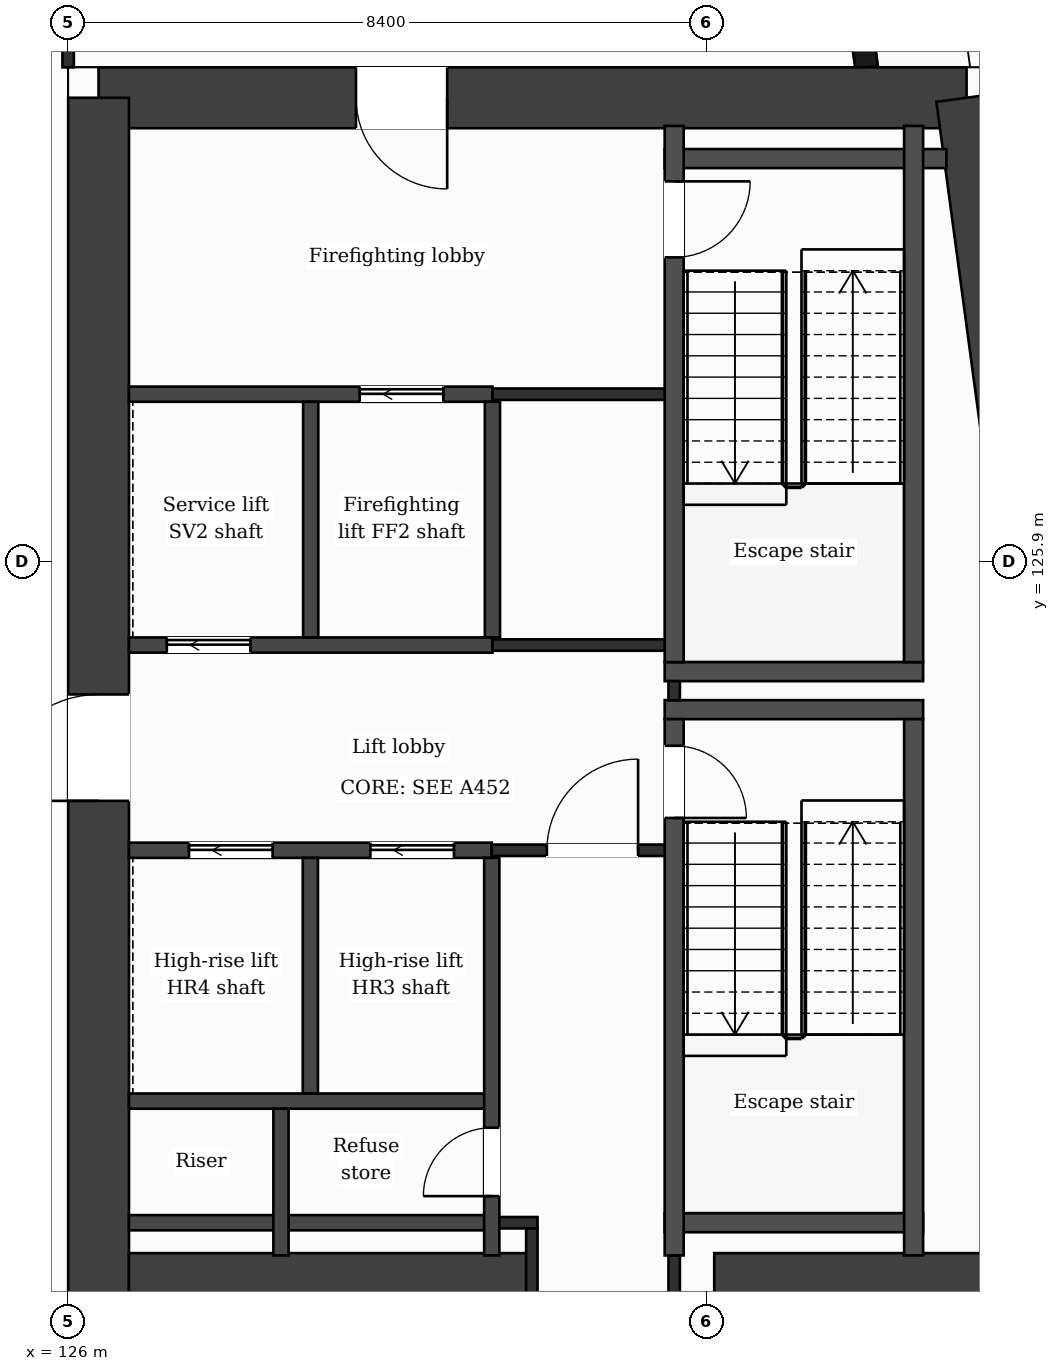
"""IFC4 building model, lengths in metres.
Left out: names, types, materials, properties, quantities, classifications, styles, units other than length and angle.
Written with IfcOpenShell. Run it as: python <this file> out.ifc"""

import sys

from ifc_helpers import new_model, si_unit, direction, frame, frame_2d, origin, place, context, subcontext, project, spatial, rectangle, extrude, element, fill, save


model = new_model("IFC4")
c1 = context("Model", 3, precision=1e-05, world=origin(), true_north=direction((0.0, 1.0)))
c2 = subcontext(c1, "Body", "Model", "MODEL_VIEW")
j1 = project(units=[si_unit("LENGTHUNIT", "METRE"), si_unit("PLANEANGLEUNIT", "RADIAN")], contexts=[c1])
p1 = place(None, origin())
s1 = spatial("IfcSite", under=j1, at=p1, CompositionType="ELEMENT")
p2 = place(p1, origin())
s2 = spatial("IfcBuilding", under=s1, at=p2, CompositionType="ELEMENT")
p3 = place(p2, frame((0.0, 0.0, 213.3)))
s3 = spatial("IfcBuildingStorey", under=s2, at=p3, CompositionType="ELEMENT", Elevation=213.3)
p4 = place(p3, frame((126.4, 132.0, 0.0), z_axis=(0.0, 0.0, 1.0), x_axis=(1.0, 0.0, 0.0)))
e1 = element("IfcWall", 1, at=p4, inside=s3, PredefinedType="SHEAR", context=c2, shape_type="SweptSolid", body=[
    extrude(rectangle(XDim=11.42, YDim=0.8, at=frame_2d((5.71, 0.0))), origin(), (0.0, 0.0, 1.0), 3.7),
])
p5 = place(p4, frame((3.386, 0.0, 0.0)))
e2 = element("IfcOpeningElement", 2, at=p5, cuts=e1, PredefinedType="OPENING", context=c2, shape_type="SweptSolid", body=[
    extrude(rectangle(XDim=1.2, YDim=2.1, at=frame_2d((0.6, 1.05))), frame((0.0, 0.41, 0.0), z_axis=(0.0, -1.0, 0.0), x_axis=(1.0, 0.0, 0.0)), (0.0, 0.0, 1.0), 0.82),
])
p6 = place(p3, frame((137.82, 132.0, 0.0), z_axis=(0.0, 0.0, 1.0), x_axis=(0.133408347329, -0.991061154956, 0.0)))
e3 = element("IfcWall", 3, at=p6, inside=s3, PredefinedType="SHEAR", context=c2, shape_type="SweptSolid", body=[
    extrude(rectangle(XDim=21.391, YDim=0.8, at=frame_2d((10.696, 0.0))), origin(), (0.0, 0.0, 1.0), 3.7),
])
p7 = place(p3, frame((126.4, 110.8, 0.0), z_axis=(0.0, 0.0, 1.0), x_axis=(0.0, 1.0, 0.0)))
e4 = element("IfcWall", 4, at=p7, inside=s3, PredefinedType="SHEAR", context=c2, shape_type="SweptSolid", body=[
    extrude(rectangle(XDim=21.2, YDim=0.8, at=frame_2d((10.6, 0.0))), origin(), (0.0, 0.0, 1.0), 3.7),
])
p8 = place(p7, frame((11.95, 0.0, 0.0)))
e5 = element("IfcOpeningElement", 5, at=p8, cuts=e4, PredefinedType="OPENING", context=c2, shape_type="SweptSolid", body=[
    extrude(rectangle(XDim=1.4, YDim=2.1, at=frame_2d((0.7, 1.05))), frame((0.0, 0.41, 0.0), z_axis=(0.0, -1.0, 0.0), x_axis=(1.0, 0.0, 0.0)), (0.0, 0.0, 1.0), 0.82),
])
p9 = place(p3, frame((126.8, 116.4, 0.0), z_axis=(0.0, 0.0, 1.0), x_axis=(1.0, 0.0, 0.0)))
e6 = element("IfcWall", 6, at=p9, inside=s3, PredefinedType="SHEAR", context=c2, shape_type="SweptSolid", body=[
    extrude(rectangle(XDim=5.3, YDim=0.8, at=frame_2d((2.65, 0.0))), origin(), (0.0, 0.0, 1.0), 3.7),
])
p10 = place(p3, frame((134.5, 116.4, 0.0), z_axis=(0.0, 0.0, 1.0), x_axis=(1.0, 0.0, 0.0)))
e7 = element("IfcWall", 7, at=p10, inside=s3, PredefinedType="SHEAR", context=c2, shape_type="SweptSolid", body=[
    extrude(rectangle(XDim=5.077, YDim=0.8, at=frame_2d((2.539, 0.0))), origin(), (0.0, 0.0, 1.0), 3.7),
])
p11 = place(p3, frame((136.504, 132.4, 0.0), z_axis=(0.0, 0.0, 1.0), x_axis=(-0.133399697462, 0.99106231929, 0.0)))
e8 = element("IfcWall", 8, at=p11, inside=s3, PredefinedType="SOLIDWALL", context=c2, shape_type="SweptSolid", body=[
    extrude(rectangle(XDim=6.74, YDim=0.3, at=frame_2d((3.37, 0.0))), origin(), (0.0, 0.0, 1.0), 3.38),
])
p12 = place(p11, frame((1.115, 0.0, 0.0)))
e9 = element("IfcOpeningElement", 9, at=p12, cuts=e8, PredefinedType="OPENING", context=c2, shape_type="SweptSolid", body=[
    extrude(rectangle(XDim=1.2, YDim=2.4, at=frame_2d((0.6, 1.2))), frame((0.0, 0.16, 0.0), z_axis=(0.0, -1.0, 0.0), x_axis=(1.0, 0.0, 0.0)), (0.0, 0.0, 1.0), 0.32),
])
p13 = place(p11, frame((3.835, 0.0, 0.9)))
e10 = element("IfcOpeningElement", 10, at=p13, cuts=e8, PredefinedType="OPENING", context=c2, shape_type="SweptSolid", body=[
    extrude(rectangle(XDim=2.4, YDim=2.1, at=frame_2d((1.2, 1.05))), frame((0.0, 0.16, 0.0), z_axis=(0.0, -1.0, 0.0), x_axis=(1.0, 0.0, 0.0)), (0.0, 0.0, 1.0), 0.32),
])
p14 = place(p3, frame((126.8, 117.2, 0.0), z_axis=(0.0, 0.0, 1.0), x_axis=(1.0, 0.0, 0.0)))
e11 = element("IfcWall", 11, at=p14, inside=s3, PredefinedType="PARTITIONING", context=c2, shape_type="SweptSolid", body=[
    extrude(rectangle(XDim=4.773, YDim=0.2, at=frame_2d((2.386, 0.0))), origin(), (0.0, 0.0, 1.0), 3.38),
])
p15 = place(p3, frame((131.573, 117.2, 0.0), z_axis=(0.0, 0.0, 1.0), x_axis=(1.0, 0.0, 0.0)))
e12 = element("IfcWall", 12, at=p15, inside=s3, PredefinedType="PARTITIONING", context=c2, shape_type="SweptSolid", body=[
    extrude(rectangle(XDim=0.602, YDim=0.15, at=frame_2d((0.301, 0.0))), origin(), (0.0, 0.0, 1.0), 3.38),
])
p16 = place(p3, frame((133.848, 117.2, 0.0), z_axis=(0.0, 0.0, 1.0), x_axis=(1.0, 0.0, 0.0)))
e13 = element("IfcWall", 13, at=p16, inside=s3, PredefinedType="PARTITIONING", context=c2, shape_type="SweptSolid", body=[
    extrude(rectangle(XDim=3.4, YDim=0.25, at=frame_2d((1.7, 0.0))), origin(), (0.0, 0.0, 1.0), 3.38),
])
p17 = place(p3, frame((126.8, 118.8, 0.0), z_axis=(0.0, 0.0, 1.0), x_axis=(1.0, 0.0, 0.0)))
e14 = element("IfcWall", 14, at=p17, inside=s3, PredefinedType="PARTITIONING", context=c2, shape_type="SweptSolid", body=[
    extrude(rectangle(XDim=4.773, YDim=0.2, at=frame_2d((2.386, 0.0))), origin(), (0.0, 0.0, 1.0), 3.38),
])
p18 = place(p3, frame((126.8, 122.1, 0.0), z_axis=(0.0, 0.0, 1.0), x_axis=(1.0, 0.0, 0.0)))
e15 = element("IfcWall", 15, at=p18, inside=s3, PredefinedType="PARTITIONING", context=c2, shape_type="SweptSolid", body=[
    extrude(rectangle(XDim=4.773, YDim=0.2, at=frame_2d((2.386, 0.0))), origin(), (0.0, 0.0, 1.0), 3.38),
])
p19 = place(p18, frame((3.176, 0.0, 0.0)))
e16 = element("IfcOpeningElement", 16, at=p19, cuts=e15, PredefinedType="OPENING", context=c2, shape_type="SweptSolid", body=[
    extrude(rectangle(XDim=1.1, YDim=2.1, at=frame_2d((0.55, 1.05))), frame((0.0, 0.11, 0.0), z_axis=(0.0, -1.0, 0.0), x_axis=(1.0, 0.0, 0.0)), (0.0, 0.0, 1.0), 0.22),
])
p20 = place(p18, frame((0.79, 0.0, 0.0)))
e17 = element("IfcOpeningElement", 17, at=p20, cuts=e15, PredefinedType="OPENING", context=c2, shape_type="SweptSolid", body=[
    extrude(rectangle(XDim=1.1, YDim=2.1, at=frame_2d((0.55, 1.05))), frame((0.0, 0.11, 0.0), z_axis=(0.0, -1.0, 0.0), x_axis=(1.0, 0.0, 0.0)), (0.0, 0.0, 1.0), 0.22),
])
p21 = place(p3, frame((131.573, 122.1, 0.0), z_axis=(0.0, 0.0, 1.0), x_axis=(1.0, 0.0, 0.0)))
e18 = element("IfcWall", 18, at=p21, inside=s3, PredefinedType="PARTITIONING", context=c2, shape_type="SweptSolid", body=[
    extrude(rectangle(XDim=2.4, YDim=0.15, at=frame_2d((1.2, 0.0))), origin(), (0.0, 0.0, 1.0), 3.38),
])
p22 = place(p21, frame((0.725, 0.0, 0.0)))
e19 = element("IfcOpeningElement", 19, at=p22, cuts=e18, PredefinedType="OPENING", context=c2, shape_type="SweptSolid", body=[
    extrude(rectangle(XDim=1.2, YDim=2.1, at=frame_2d((0.6, 1.05))), frame((0.0, 0.085, 0.0), z_axis=(0.0, -1.0, 0.0), x_axis=(1.0, 0.0, 0.0)), (0.0, 0.0, 1.0), 0.17),
])
for number, where, z_axis, x_axis in (
    (20, (133.848, 123.95, 0.0), (0.0, 0.0, 1.0), (1.0, 0.0, 0.0)),
    (21, (133.848, 124.45, 0.0), (0.0, 0.0, 1.0), (1.0, 0.0, 0.0)),
):
    element("IfcWall", number, at=place(p3, frame(where, z_axis=z_axis, x_axis=x_axis)), inside=s3, PredefinedType="PARTITIONING", context=c2, shape_type="SweptSolid", body=[
        extrude(rectangle(XDim=3.4, YDim=0.25, at=frame_2d((1.7, 0.0))), origin(), (0.0, 0.0, 1.0), 3.38),
    ])
p23 = place(p3, frame((126.8, 124.8, 0.0), z_axis=(0.0, 0.0, 1.0), x_axis=(1.0, 0.0, 0.0)))
e22 = element("IfcWall", 22, at=p23, inside=s3, PredefinedType="PARTITIONING", context=c2, shape_type="SweptSolid", body=[
    extrude(rectangle(XDim=4.782, YDim=0.2, at=frame_2d((2.391, 0.0))), origin(), (0.0, 0.0, 1.0), 3.38),
])
p24 = place(p23, frame((0.498, 0.0, 0.0)))
e23 = element("IfcOpeningElement", 23, at=p24, cuts=e22, PredefinedType="OPENING", context=c2, shape_type="SweptSolid", body=[
    extrude(rectangle(XDim=1.1, YDim=2.1, at=frame_2d((0.55, 1.05))), frame((0.0, 0.11, 0.0), z_axis=(0.0, -1.0, 0.0), x_axis=(1.0, 0.0, 0.0)), (0.0, 0.0, 1.0), 0.22),
])
p25 = place(p3, frame((131.582, 124.8, 0.0), z_axis=(0.0, 0.0, 1.0), x_axis=(1.0, 0.0, 0.0)))
e24 = element("IfcWall", 24, at=p25, inside=s3, PredefinedType="PARTITIONING", context=c2, shape_type="SweptSolid", body=[
    extrude(rectangle(XDim=2.516, YDim=0.15, at=frame_2d((1.258, 0.0))), origin(), (0.0, 0.0, 1.0), 3.38),
])
p26 = place(p3, frame((126.8, 128.1, 0.0), z_axis=(0.0, 0.0, 1.0), x_axis=(1.0, 0.0, 0.0)))
e25 = element("IfcWall", 25, at=p26, inside=s3, PredefinedType="PARTITIONING", context=c2, shape_type="SweptSolid", body=[
    extrude(rectangle(XDim=4.782, YDim=0.2, at=frame_2d((2.391, 0.0))), origin(), (0.0, 0.0, 1.0), 3.38),
])
p27 = place(p26, frame((3.036, 0.0, 0.0)))
e26 = element("IfcOpeningElement", 26, at=p27, cuts=e25, PredefinedType="OPENING", context=c2, shape_type="SweptSolid", body=[
    extrude(rectangle(XDim=1.1, YDim=2.1, at=frame_2d((0.55, 1.05))), frame((0.0, 0.11, 0.0), z_axis=(0.0, -1.0, 0.0), x_axis=(1.0, 0.0, 0.0)), (0.0, 0.0, 1.0), 0.22),
])
p28 = place(p3, frame((131.582, 128.1, 0.0), z_axis=(0.0, 0.0, 1.0), x_axis=(1.0, 0.0, 0.0)))
e27 = element("IfcWall", 27, at=p28, inside=s3, PredefinedType="PARTITIONING", context=c2, shape_type="SweptSolid", body=[
    extrude(rectangle(XDim=2.391, YDim=0.15, at=frame_2d((1.195, 0.0))), origin(), (0.0, 0.0, 1.0), 3.38),
])
p29 = place(p3, frame((133.848, 131.2, 0.0), z_axis=(0.0, 0.0, 1.0), x_axis=(1.0, 0.0, 0.0)))
e28 = element("IfcWall", 28, at=p29, inside=s3, PredefinedType="PARTITIONING", context=c2, shape_type="SweptSolid", body=[
    extrude(rectangle(XDim=3.706, YDim=0.25, at=frame_2d((1.853, 0.0))), origin(), (0.0, 0.0, 1.0), 3.38),
])
p30 = place(p3, frame((126.0, 132.4, 0.0), z_axis=(0.0, 0.0, 1.0), x_axis=(0.0, 1.0, 0.0)))
e29 = element("IfcWall", 29, at=p30, inside=s3, PredefinedType="PARTITIONING", context=c2, shape_type="SweptSolid", body=[
    extrude(rectangle(XDim=1.325, YDim=0.15, at=frame_2d((0.663, 0.0))), origin(), (0.0, 0.0, 1.0), 3.38),
])
p31 = place(p3, frame((128.8, 116.77, 0.0), z_axis=(0.0, 0.0, 1.0), x_axis=(0.0, 1.0, 0.0)))
e30 = element("IfcWall", 30, at=p31, inside=s3, PredefinedType="PARTITIONING", context=c2, shape_type="SweptSolid", body=[
    extrude(rectangle(XDim=1.93, YDim=0.2, at=frame_2d((0.965, 0.0))), origin(), (0.0, 0.0, 1.0), 3.38),
])
for number, where, z_axis, x_axis in (
    (31, (129.187, 118.9, 0.0), (0.0, 0.0, 1.0), (0.0, 1.0, 0.0)),
    (32, (129.191, 124.9, 0.0), (0.0, 0.0, 1.0), (0.0, 1.0, 0.0)),
):
    element("IfcWall", number, at=place(p3, frame(where, z_axis=z_axis, x_axis=x_axis)), inside=s3, PredefinedType="PARTITIONING", context=c2, shape_type="SweptSolid", body=[
        extrude(rectangle(XDim=3.1, YDim=0.2, at=frame_2d((1.55, 0.0))), origin(), (0.0, 0.0, 1.0), 3.38),
    ])
p32 = place(p3, frame((131.573, 116.77, 0.0), z_axis=(0.0, 0.0, 1.0), x_axis=(0.0, 1.0, 0.0)))
e33 = element("IfcWall", 33, at=p32, inside=s3, PredefinedType="PARTITIONING", context=c2, shape_type="SweptSolid", body=[
    extrude(rectangle(XDim=5.23, YDim=0.2, at=frame_2d((2.615, 0.0))), origin(), (0.0, 0.0, 1.0), 3.38),
])
p33 = place(p32, frame((0.78, 0.0, 0.0)))
e34 = element("IfcOpeningElement", 34, at=p33, cuts=e33, PredefinedType="OPENING", context=c2, shape_type="SweptSolid", body=[
    extrude(rectangle(XDim=0.9, YDim=2.1, at=frame_2d((0.45, 1.05))), frame((0.0, 0.11, 0.0), z_axis=(0.0, -1.0, 0.0), x_axis=(1.0, 0.0, 0.0)), (0.0, 0.0, 1.0), 0.22),
])
p34 = place(p3, frame((131.582, 124.9, 0.0), z_axis=(0.0, 0.0, 1.0), x_axis=(0.0, 1.0, 0.0)))
e35 = element("IfcWall", 35, at=p34, inside=s3, PredefinedType="PARTITIONING", context=c2, shape_type="SweptSolid", body=[
    extrude(rectangle(XDim=3.1, YDim=0.2, at=frame_2d((1.55, 0.0))), origin(), (0.0, 0.0, 1.0), 3.38),
])
p35 = place(p3, frame((132.1, 116.0, 0.0), z_axis=(0.0, 0.0, 1.0), x_axis=(0.0, 1.0, 0.0)))
e36 = element("IfcWall", 36, at=p35, inside=s3, PredefinedType="PARTITIONING", context=c2, shape_type="SweptSolid", body=[
    extrude(rectangle(XDim=1.125, YDim=0.15, at=frame_2d((0.562, 0.0))), origin(), (0.0, 0.0, 1.0), 3.38),
])
p36 = place(p3, frame((133.973, 116.0, 0.0), z_axis=(0.0, 0.0, 1.0), x_axis=(0.0, 1.0, 0.0)))
e37 = element("IfcWall", 37, at=p36, inside=s3, PredefinedType="PARTITIONING", context=c2, shape_type="SweptSolid", body=[
    extrude(rectangle(XDim=0.77, YDim=0.15, at=frame_2d((0.385, 0.0))), origin(), (0.0, 0.0, 1.0), 3.38),
])
p37 = place(p3, frame((133.973, 124.075, 0.0), z_axis=(0.0, 0.0, 1.0), x_axis=(0.0, 1.0, 0.0)))
e38 = element("IfcWall", 38, at=p37, inside=s3, PredefinedType="PARTITIONING", context=c2, shape_type="SweptSolid", body=[
    extrude(rectangle(XDim=0.25, YDim=0.15, at=frame_2d((0.125, 0.0))), origin(), (0.0, 0.0, 1.0), 3.38),
])
p38 = place(p3, frame((133.973, 116.77, 0.0), z_axis=(0.0, 0.0, 1.0), x_axis=(0.0, 1.0, 0.0)))
e39 = element("IfcWall", 39, at=p38, inside=s3, PredefinedType="PARTITIONING", context=c2, shape_type="SweptSolid", body=[
    extrude(rectangle(XDim=7.055, YDim=0.25, at=frame_2d((3.527, 0.0))), origin(), (0.0, 0.0, 1.0), 3.38),
])
p39 = place(p38, frame((5.755, 0.0, 0.0)))
e40 = element("IfcOpeningElement", 40, at=p39, cuts=e39, PredefinedType="OPENING", context=c2, shape_type="SweptSolid", body=[
    extrude(rectangle(XDim=0.95, YDim=2.1, at=frame_2d((0.475, 1.05))), frame((0.0, 0.135, 0.0), z_axis=(0.0, -1.0, 0.0), x_axis=(1.0, 0.0, 0.0)), (0.0, 0.0, 1.0), 0.27),
])
p40 = place(p3, frame((133.973, 124.575, 0.0), z_axis=(0.0, 0.0, 1.0), x_axis=(0.0, 1.0, 0.0)))
e41 = element("IfcWall", 41, at=p40, inside=s3, PredefinedType="PARTITIONING", context=c2, shape_type="SweptSolid", body=[
    extrude(rectangle(XDim=7.055, YDim=0.25, at=frame_2d((3.527, 0.0))), origin(), (0.0, 0.0, 1.0), 3.38),
])
p41 = place(p40, frame((5.325, 0.0, 0.0)))
e42 = element("IfcOpeningElement", 42, at=p41, cuts=e41, PredefinedType="OPENING", context=c2, shape_type="SweptSolid", body=[
    extrude(rectangle(XDim=1.0, YDim=2.1, at=frame_2d((0.5, 1.05))), frame((0.0, 0.135, 0.0), z_axis=(0.0, -1.0, 0.0), x_axis=(1.0, 0.0, 0.0)), (0.0, 0.0, 1.0), 0.27),
])
for number, where, z_axis, x_axis in (
    (43, (137.123, 116.77, 0.0), (0.0, 0.0, 1.0), (0.0, 1.0, 0.0)),
    (44, (137.123, 124.575, 0.0), (0.0, 0.0, 1.0), (0.0, 1.0, 0.0)),
):
    element("IfcWall", number, at=place(p3, frame(where, z_axis=z_axis, x_axis=x_axis)), inside=s3, PredefinedType="PARTITIONING", context=c2, shape_type="SweptSolid", body=[
        extrude(rectangle(XDim=7.055, YDim=0.25, at=frame_2d((3.527, 0.0))), origin(), (0.0, 0.0, 1.0), 3.38),
    ])
p42 = place(p22, origin())
e45 = element("IfcDoor", 45, at=p42, inside=s3, OperationType="SINGLE_SWING_RIGHT", PredefinedType="DOOR", context=c2, shape_type="SweptSolid", body=[
    extrude(rectangle(XDim=1.2, YDim=2.1, at=frame_2d((0.6, 1.05))), frame((0.0, 0.025, 0.0), z_axis=(0.0, -1.0, 0.0), x_axis=(1.0, 0.0, 0.0)), (0.0, 0.0, 1.0), 0.05),
])
fill(e19, e45)
p43 = place(p19, origin())
e46 = element("IfcDoor", 46, at=p43, inside=s3, OperationType="SLIDING_TO_LEFT", PredefinedType="DOOR", context=c2, shape_type="SweptSolid", body=[
    extrude(rectangle(XDim=1.1, YDim=2.1, at=frame_2d((0.55, 1.05))), frame((0.0, 0.025, 0.0), z_axis=(0.0, -1.0, 0.0), x_axis=(1.0, 0.0, 0.0)), (0.0, 0.0, 1.0), 0.05),
])
fill(e16, e46)
p44 = place(p20, origin())
e47 = element("IfcDoor", 47, at=p44, inside=s3, OperationType="SLIDING_TO_LEFT", PredefinedType="DOOR", context=c2, shape_type="SweptSolid", body=[
    extrude(rectangle(XDim=1.1, YDim=2.1, at=frame_2d((0.55, 1.05))), frame((0.0, 0.025, 0.0), z_axis=(0.0, -1.0, 0.0), x_axis=(1.0, 0.0, 0.0)), (0.0, 0.0, 1.0), 0.05),
])
fill(e17, e47)
p45 = place(p27, origin())
e48 = element("IfcDoor", 48, at=p45, inside=s3, OperationType="SLIDING_TO_LEFT", PredefinedType="DOOR", context=c2, shape_type="SweptSolid", body=[
    extrude(rectangle(XDim=1.1, YDim=2.1, at=frame_2d((0.55, 1.05))), frame((0.0, 0.025, 0.0), z_axis=(0.0, -1.0, 0.0), x_axis=(1.0, 0.0, 0.0)), (0.0, 0.0, 1.0), 0.05),
])
fill(e26, e48)
p46 = place(p24, origin())
e49 = element("IfcDoor", 49, at=p46, inside=s3, OperationType="SLIDING_TO_LEFT", PredefinedType="DOOR", context=c2, shape_type="SweptSolid", body=[
    extrude(rectangle(XDim=1.1, YDim=2.1, at=frame_2d((0.55, 1.05))), frame((0.0, 0.025, 0.0), z_axis=(0.0, -1.0, 0.0), x_axis=(1.0, 0.0, 0.0)), (0.0, 0.0, 1.0), 0.05),
])
fill(e23, e49)
p47 = place(p39, origin())
e50 = element("IfcDoor", 50, at=p47, inside=s3, OperationType="SINGLE_SWING_LEFT", PredefinedType="DOOR", context=c2, shape_type="SweptSolid", body=[
    extrude(rectangle(XDim=0.95, YDim=2.1, at=frame_2d((0.475, 1.05))), frame((0.0, 0.025, 0.0), z_axis=(0.0, -1.0, 0.0), x_axis=(1.0, 0.0, 0.0)), (0.0, 0.0, 1.0), 0.05),
])
fill(e40, e50)
p48 = place(p41, origin())
e51 = element("IfcDoor", 51, at=p48, inside=s3, OperationType="SINGLE_SWING_RIGHT", PredefinedType="DOOR", context=c2, shape_type="SweptSolid", body=[
    extrude(rectangle(XDim=1.0, YDim=2.1, at=frame_2d((0.5, 1.05))), frame((0.0, 0.025, 0.0), z_axis=(0.0, -1.0, 0.0), x_axis=(1.0, 0.0, 0.0)), (0.0, 0.0, 1.0), 0.05),
])
fill(e42, e51)
p49 = place(p33, origin())
e52 = element("IfcDoor", 52, at=p49, inside=s3, OperationType="SINGLE_SWING_LEFT", PredefinedType="DOOR", context=c2, shape_type="SweptSolid", body=[
    extrude(rectangle(XDim=0.9, YDim=2.1, at=frame_2d((0.45, 1.05))), frame((0.0, 0.025, 0.0), z_axis=(0.0, -1.0, 0.0), x_axis=(1.0, 0.0, 0.0)), (0.0, 0.0, 1.0), 0.05),
])
fill(e34, e52)
p50 = place(p5, origin())
e53 = element("IfcDoor", 53, at=p50, inside=s3, OperationType="SINGLE_SWING_RIGHT", PredefinedType="DOOR", context=c2, shape_type="SweptSolid", body=[
    extrude(rectangle(XDim=1.2, YDim=2.1, at=frame_2d((0.6, 1.05))), frame((0.0, 0.025, 0.0), z_axis=(0.0, -1.0, 0.0), x_axis=(1.0, 0.0, 0.0)), (0.0, 0.0, 1.0), 0.05),
])
fill(e2, e53)
p51 = place(p8, origin())
e54 = element("IfcDoor", 54, at=p51, inside=s3, OperationType="SINGLE_SWING_LEFT", PredefinedType="DOOR", context=c2, shape_type="SweptSolid", body=[
    extrude(rectangle(XDim=1.4, YDim=2.1, at=frame_2d((0.7, 1.05))), frame((0.0, 0.025, 0.0), z_axis=(0.0, -1.0, 0.0), x_axis=(1.0, 0.0, 0.0)), (0.0, 0.0, 1.0), 0.05),
])
fill(e5, e54)
save(model, sys.argv[1])
